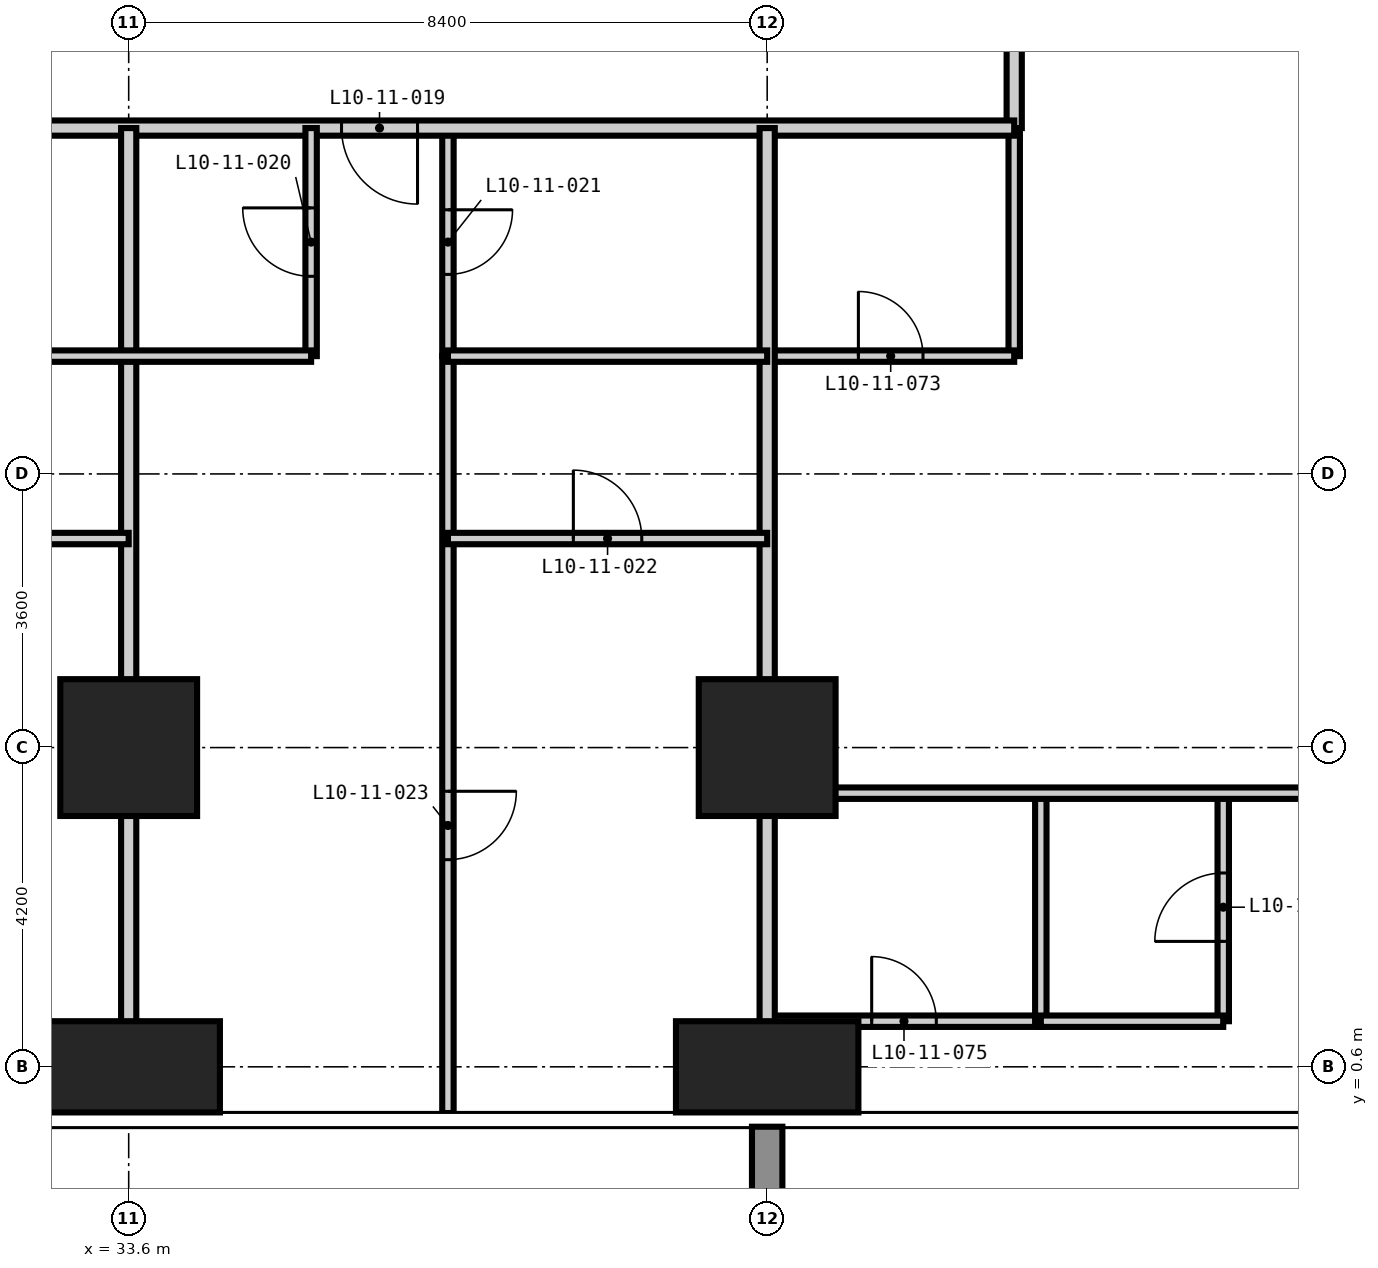
"""IFC4 building model, lengths in metres.
Left out: names, types, materials, properties, quantities, classifications, styles, units other than length and angle.
Written with IfcOpenShell. Run it as: python <this file> out.ifc"""

import sys

from ifc_helpers import new_model, si_unit, direction, frame, frame_2d, origin, origin_2d, place, context, subcontext, project, spatial, rectangle, extrude, element, fill, save


model = new_model("IFC4")
c1 = context("Model", 3, precision=1e-05, world=origin(), true_north=direction((0.0, 1.0)))
c2 = subcontext(c1, "Body", "Model", "MODEL_VIEW")
j1 = project(units=[si_unit("LENGTHUNIT", "METRE"), si_unit("PLANEANGLEUNIT", "RADIAN")], contexts=[c1])
p1 = place(None, origin())
s1 = spatial("IfcSite", under=j1, at=p1, CompositionType="ELEMENT")
p2 = place(p1, origin())
s2 = spatial("IfcBuilding", under=s1, at=p2, CompositionType="ELEMENT")
p3 = place(p2, frame((0.0, 0.0, 45.0)))
s3 = spatial("IfcBuildingStorey", under=s2, at=p3, CompositionType="ELEMENT", Elevation=45.0)
p4 = place(p3, frame((33.6, 0.6, -0.35), z_axis=(0.0, 0.0, 1.0), x_axis=(1.0, 0.0, 0.0)))
e1 = element("IfcColumn", 1, at=p4, inside=s3, PredefinedType="COLUMN", context=c2, shape_type="SweptSolid", body=[
    extrude(rectangle(XDim=2.4, YDim=1.2, at=origin_2d()), origin(), (0.0, 0.0, 1.0), 3.6),
])
p5 = place(p3, frame((33.6, 4.8, -0.35), z_axis=(0.0, 0.0, 1.0), x_axis=(1.0, 0.0, 0.0)))
e2 = element("IfcColumn", 2, at=p5, inside=s3, PredefinedType="COLUMN", context=c2, shape_type="SweptSolid", body=[
    extrude(rectangle(XDim=1.8, YDim=1.8, at=origin_2d()), origin(), (0.0, 0.0, 1.0), 3.6),
])
p6 = place(p3, frame((42.0, 0.6, -0.35), z_axis=(0.0, 0.0, 1.0), x_axis=(1.0, 0.0, 0.0)))
e3 = element("IfcColumn", 3, at=p6, inside=s3, PredefinedType="COLUMN", context=c2, shape_type="SweptSolid", body=[
    extrude(rectangle(XDim=2.4, YDim=1.2, at=origin_2d()), origin(), (0.0, 0.0, 1.0), 3.6),
])
p7 = place(p3, frame((42.0, 4.8, -0.35), z_axis=(0.0, 0.0, 1.0), x_axis=(1.0, 0.0, 0.0)))
e4 = element("IfcColumn", 4, at=p7, inside=s3, PredefinedType="COLUMN", context=c2, shape_type="SweptSolid", body=[
    extrude(rectangle(XDim=1.8, YDim=1.8, at=origin_2d()), origin(), (0.0, 0.0, 1.0), 3.6),
])
p8 = place(p3, frame((37.8, 9.95, 0.0), z_axis=(0.0, 0.0, 1.0), x_axis=(0.0, 1.0, 0.0)))
e5 = element("IfcWall", 5, at=p8, inside=s3, PredefinedType="PARTITIONING", context=c2, shape_type="SweptSolid", body=[
    extrude(rectangle(XDim=3.0, YDim=0.15, at=frame_2d((1.5, 0.0))), origin(), (0.0, 0.0, 1.0), 3.25),
])
p9 = place(p8, frame((1.075, 0.0, 0.0)))
e6 = element("IfcOpeningElement", 6, at=p9, cuts=e5, PredefinedType="OPENING", context=c2, shape_type="SweptSolid", body=[
    extrude(rectangle(XDim=0.85, YDim=2.1, at=frame_2d((0.425, 1.05))), frame((0.0, 0.085, 0.0), z_axis=(0.0, -1.0, 0.0), x_axis=(1.0, 0.0, 0.0)), (0.0, 0.0, 1.0), 0.17),
])
p10 = place(p3, frame((45.25, 9.95, 0.0), z_axis=(0.0, 0.0, 1.0), x_axis=(0.0, 1.0, 0.0)))
e7 = element("IfcWall", 7, at=p10, inside=s3, PredefinedType="PARTITIONING", context=c2, shape_type="SweptSolid", body=[
    extrude(rectangle(XDim=3.0, YDim=0.15, at=frame_2d((1.5, 0.0))), origin(), (0.0, 0.0, 1.0), 3.25),
])
p11 = place(p3, frame((42.0, 1.2, 0.0), z_axis=(0.0, 0.0, 1.0), x_axis=(1.0, 0.0, 0.0)))
e8 = element("IfcWall", 8, at=p11, inside=s3, PredefinedType="PARTITIONING", context=c2, shape_type="SweptSolid", body=[
    extrude(rectangle(XDim=3.6, YDim=0.15, at=frame_2d((1.8, 0.0))), origin(), (0.0, 0.0, 1.0), 3.25),
])
p12 = place(p11, frame((1.375, 0.0, 0.0)))
e9 = element("IfcOpeningElement", 9, at=p12, cuts=e8, PredefinedType="OPENING", context=c2, shape_type="SweptSolid", body=[
    extrude(rectangle(XDim=0.85, YDim=2.1, at=frame_2d((0.425, 1.05))), frame((0.0, 0.085, 0.0), z_axis=(0.0, -1.0, 0.0), x_axis=(1.0, 0.0, 0.0)), (0.0, 0.0, 1.0), 0.17),
])
p13 = place(p3, frame((42.0, 9.95, 0.0), z_axis=(0.0, 0.0, 1.0), x_axis=(1.0, 0.0, 0.0)))
e10 = element("IfcWall", 10, at=p13, inside=s3, PredefinedType="PARTITIONING", context=c2, shape_type="SweptSolid", body=[
    extrude(rectangle(XDim=3.25, YDim=0.15, at=frame_2d((1.625, 0.0))), origin(), (0.0, 0.0, 1.0), 3.25),
])
p14 = place(p13, frame((1.2, 0.0, 0.0)))
e11 = element("IfcOpeningElement", 11, at=p14, cuts=e10, PredefinedType="OPENING", context=c2, shape_type="SweptSolid", body=[
    extrude(rectangle(XDim=0.85, YDim=2.1, at=frame_2d((0.425, 1.05))), frame((0.0, 0.085, 0.0), z_axis=(0.0, -1.0, 0.0), x_axis=(1.0, 0.0, 0.0)), (0.0, 0.0, 1.0), 0.17),
])
p15 = place(p3, frame((45.25, 45.55, 0.0), z_axis=(0.0, 0.0, 1.0), x_axis=(0.0, -1.0, 0.0)))
e12 = element("IfcWall", 12, at=p15, inside=s3, PredefinedType="PARTITIONING", context=c2, shape_type="SweptSolid", body=[
    extrude(rectangle(XDim=32.6, YDim=0.2, at=frame_2d((16.3, 0.0))), origin(), (0.0, 0.0, 1.0), 3.25),
])
p16 = place(p15, frame((24.8, 0.0, 0.0)))
e13 = element("IfcOpeningElement", 13, at=p16, cuts=e12, PredefinedType="OPENING", context=c2, shape_type="SweptSolid", body=[
    extrude(rectangle(XDim=1.0, YDim=2.2, at=frame_2d((0.5, 1.1))), frame((0.0, 0.11, 0.0), z_axis=(0.0, -1.0, 0.0), x_axis=(1.0, 0.0, 0.0)), (0.0, 0.0, 1.0), 0.22),
])
p17 = place(p15, frame((19.85, 0.0, 0.0)))
e14 = element("IfcOpeningElement", 14, at=p17, cuts=e12, PredefinedType="OPENING", context=c2, shape_type="SweptSolid", body=[
    extrude(rectangle(XDim=1.0, YDim=2.2, at=frame_2d((0.5, 1.1))), frame((0.0, 0.11, 0.0), z_axis=(0.0, -1.0, 0.0), x_axis=(1.0, 0.0, 0.0)), (0.0, 0.0, 1.0), 0.22),
])
p18 = place(p15, frame((11.45, 0.0, 0.0)))
e15 = element("IfcOpeningElement", 15, at=p18, cuts=e12, PredefinedType="OPENING", context=c2, shape_type="SweptSolid", body=[
    extrude(rectangle(XDim=1.0, YDim=2.2, at=frame_2d((0.5, 1.1))), frame((0.0, 0.11, 0.0), z_axis=(0.0, -1.0, 0.0), x_axis=(1.0, 0.0, 0.0)), (0.0, 0.0, 1.0), 0.22),
])
p19 = place(p15, frame((6.5, 0.0, 0.0)))
e16 = element("IfcOpeningElement", 16, at=p19, cuts=e12, PredefinedType="OPENING", context=c2, shape_type="SweptSolid", body=[
    extrude(rectangle(XDim=1.0, YDim=2.2, at=frame_2d((0.5, 1.1))), frame((0.0, 0.11, 0.0), z_axis=(0.0, -1.0, 0.0), x_axis=(1.0, 0.0, 0.0)), (0.0, 0.0, 1.0), 0.22),
])
p20 = place(p15, frame((30.175, 0.0, 0.0)))
e17 = element("IfcOpeningElement", 17, at=p20, cuts=e12, PredefinedType="OPENING", context=c2, shape_type="SweptSolid", body=[
    extrude(rectangle(XDim=1.0, YDim=2.2, at=frame_2d((0.5, 1.1))), frame((0.0, 0.11, 0.0), z_axis=(0.0, -1.0, 0.0), x_axis=(1.0, 0.0, 0.0)), (0.0, 0.0, 1.0), 0.22),
])
p21 = place(p15, frame((1.275, 0.0, 0.0)))
e18 = element("IfcOpeningElement", 18, at=p21, cuts=e12, PredefinedType="OPENING", context=c2, shape_type="SweptSolid", body=[
    extrude(rectangle(XDim=1.0, YDim=2.2, at=frame_2d((0.5, 1.1))), frame((0.0, 0.11, 0.0), z_axis=(0.0, -1.0, 0.0), x_axis=(1.0, 0.0, 0.0)), (0.0, 0.0, 1.0), 0.22),
])
p22 = place(p3, frame((45.25, 12.95, 0.0), z_axis=(0.0, 0.0, 1.0), x_axis=(-1.0, 0.0, 0.0)))
e19 = element("IfcWall", 19, at=p22, inside=s3, PredefinedType="PARTITIONING", context=c2, shape_type="SweptSolid", body=[
    extrude(rectangle(XDim=32.3, YDim=0.2, at=frame_2d((16.15, 0.0))), origin(), (0.0, 0.0, 1.0), 3.25),
])
p23 = place(p22, frame((24.65, 0.0, 0.0)))
e20 = element("IfcOpeningElement", 20, at=p23, cuts=e19, PredefinedType="OPENING", context=c2, shape_type="SweptSolid", body=[
    extrude(rectangle(XDim=1.0, YDim=2.2, at=frame_2d((0.5, 1.1))), frame((0.0, 0.11, 0.0), z_axis=(0.0, -1.0, 0.0), x_axis=(1.0, 0.0, 0.0)), (0.0, 0.0, 1.0), 0.22),
])
p24 = place(p22, frame((16.25, 0.0, 0.0)))
e21 = element("IfcOpeningElement", 21, at=p24, cuts=e19, PredefinedType="OPENING", context=c2, shape_type="SweptSolid", body=[
    extrude(rectangle(XDim=1.0, YDim=2.2, at=frame_2d((0.5, 1.1))), frame((0.0, 0.11, 0.0), z_axis=(0.0, -1.0, 0.0), x_axis=(1.0, 0.0, 0.0)), (0.0, 0.0, 1.0), 0.22),
])
p25 = place(p22, frame((7.85, 0.0, 0.0)))
e22 = element("IfcOpeningElement", 22, at=p25, cuts=e19, PredefinedType="OPENING", context=c2, shape_type="SweptSolid", body=[
    extrude(rectangle(XDim=1.0, YDim=2.2, at=frame_2d((0.5, 1.1))), frame((0.0, 0.11, 0.0), z_axis=(0.0, -1.0, 0.0), x_axis=(1.0, 0.0, 0.0)), (0.0, 0.0, 1.0), 0.22),
])
for number, where, z_axis, x_axis in (
    (23, (33.6, -0.008, 0.0), (0.0, 0.0, 1.0), (0.0, 1.0, 0.0)),
    (24, (42.0, -0.008, 0.0), (0.0, 0.0, 1.0), (0.0, 1.0, 0.0)),
):
    element("IfcWall", number, at=place(p3, frame(where, z_axis=z_axis, x_axis=x_axis)), inside=s3, PredefinedType="PARTITIONING", context=c2, shape_type="SweptSolid", body=[
        extrude(rectangle(XDim=12.958, YDim=0.2, at=frame_2d((6.479, 0.0))), origin(), (0.0, 0.0, 1.0), 3.25),
    ])
p26 = place(p3, frame((36.0, 9.95, 0.0), z_axis=(0.0, 0.0, 1.0), x_axis=(0.0, 1.0, 0.0)))
e25 = element("IfcWall", 25, at=p26, inside=s3, PredefinedType="PARTITIONING", context=c2, shape_type="SweptSolid", body=[
    extrude(rectangle(XDim=3.0, YDim=0.15, at=frame_2d((1.5, 0.0))), origin(), (0.0, 0.0, 1.0), 3.25),
])
p27 = place(p26, frame((1.05, 0.0, 0.0)))
e26 = element("IfcOpeningElement", 26, at=p27, cuts=e25, PredefinedType="OPENING", context=c2, shape_type="SweptSolid", body=[
    extrude(rectangle(XDim=0.9, YDim=2.1, at=frame_2d((0.45, 1.05))), frame((0.0, 0.085, 0.0), z_axis=(0.0, -1.0, 0.0), x_axis=(1.0, 0.0, 0.0)), (0.0, 0.0, 1.0), 0.17),
])
p28 = place(p3, frame((37.8, -0.008, 0.0), z_axis=(0.0, 0.0, 1.0), x_axis=(0.0, 1.0, 0.0)))
e27 = element("IfcWall", 27, at=p28, inside=s3, PredefinedType="PARTITIONING", context=c2, shape_type="SweptSolid", body=[
    extrude(rectangle(XDim=9.958, YDim=0.15, at=frame_2d((4.979, 0.0))), origin(), (0.0, 0.0, 1.0), 3.25),
])
p29 = place(p28, frame((3.333, 0.0, 0.0)))
e28 = element("IfcOpeningElement", 28, at=p29, cuts=e27, PredefinedType="OPENING", context=c2, shape_type="SweptSolid", body=[
    extrude(rectangle(XDim=0.9, YDim=2.1, at=frame_2d((0.45, 1.05))), frame((0.0, 0.085, 0.0), z_axis=(0.0, -1.0, 0.0), x_axis=(1.0, 0.0, 0.0)), (0.0, 0.0, 1.0), 0.17),
])
p30 = place(p3, frame((45.6, 1.2, 0.0), z_axis=(0.0, 0.0, 1.0), x_axis=(0.0, 1.0, 0.0)))
e29 = element("IfcWall", 29, at=p30, inside=s3, PredefinedType="PARTITIONING", context=c2, shape_type="SweptSolid", body=[
    extrude(rectangle(XDim=3.0, YDim=0.15, at=frame_2d((1.5, 0.0))), origin(), (0.0, 0.0, 1.0), 3.25),
])
p31 = place(p3, frame((48.0, 1.2, 0.0), z_axis=(0.0, 0.0, 1.0), x_axis=(0.0, 1.0, 0.0)))
e30 = element("IfcWall", 30, at=p31, inside=s3, PredefinedType="PARTITIONING", context=c2, shape_type="SweptSolid", body=[
    extrude(rectangle(XDim=3.0, YDim=0.15, at=frame_2d((1.5, 0.0))), origin(), (0.0, 0.0, 1.0), 3.25),
])
p32 = place(p31, frame((1.05, 0.0, 0.0)))
e31 = element("IfcOpeningElement", 31, at=p32, cuts=e30, PredefinedType="OPENING", context=c2, shape_type="SweptSolid", body=[
    extrude(rectangle(XDim=0.9, YDim=2.1, at=frame_2d((0.45, 1.05))), frame((0.0, 0.085, 0.0), z_axis=(0.0, -1.0, 0.0), x_axis=(1.0, 0.0, 0.0)), (0.0, 0.0, 1.0), 0.17),
])
p33 = place(p3, frame((45.6, 1.2, 0.0), z_axis=(0.0, 0.0, 1.0), x_axis=(1.0, 0.0, 0.0)))
e32 = element("IfcWall", 32, at=p33, inside=s3, PredefinedType="PARTITIONING", context=c2, shape_type="SweptSolid", body=[
    extrude(rectangle(XDim=2.4, YDim=0.15, at=frame_2d((1.2, 0.0))), origin(), (0.0, 0.0, 1.0), 3.25),
])
p34 = place(p3, frame((42.0, 4.2, 0.0), z_axis=(0.0, 0.0, 1.0), x_axis=(1.0, 0.0, 0.0)))
e33 = element("IfcWall", 33, at=p34, inside=s3, PredefinedType="PARTITIONING", context=c2, shape_type="SweptSolid", body=[
    extrude(rectangle(XDim=16.808, YDim=0.15, at=frame_2d((8.404, 0.0))), origin(), (0.0, 0.0, 1.0), 3.25),
])
p35 = place(p34, frame((10.95, 0.0, 0.0)))
e34 = element("IfcOpeningElement", 34, at=p35, cuts=e33, PredefinedType="OPENING", context=c2, shape_type="SweptSolid", body=[
    extrude(rectangle(XDim=0.9, YDim=2.1, at=frame_2d((0.45, 1.05))), frame((0.0, 0.085, 0.0), z_axis=(0.0, -1.0, 0.0), x_axis=(1.0, 0.0, 0.0)), (0.0, 0.0, 1.0), 0.17),
])
p36 = place(p3, frame((29.4, 7.55, 0.0), z_axis=(0.0, 0.0, 1.0), x_axis=(1.0, 0.0, 0.0)))
e35 = element("IfcWall", 35, at=p36, inside=s3, PredefinedType="PARTITIONING", context=c2, shape_type="SweptSolid", body=[
    extrude(rectangle(XDim=4.2, YDim=0.15, at=frame_2d((2.1, 0.0))), origin(), (0.0, 0.0, 1.0), 3.25),
])
p37 = place(p36, frame((1.65, 0.0, 0.0)))
e36 = element("IfcOpeningElement", 36, at=p37, cuts=e35, PredefinedType="OPENING", context=c2, shape_type="SweptSolid", body=[
    extrude(rectangle(XDim=0.9, YDim=2.1, at=frame_2d((0.45, 1.05))), frame((0.0, 0.085, 0.0), z_axis=(0.0, -1.0, 0.0), x_axis=(1.0, 0.0, 0.0)), (0.0, 0.0, 1.0), 0.17),
])
p38 = place(p3, frame((37.8, 7.55, 0.0), z_axis=(0.0, 0.0, 1.0), x_axis=(1.0, 0.0, 0.0)))
e37 = element("IfcWall", 37, at=p38, inside=s3, PredefinedType="PARTITIONING", context=c2, shape_type="SweptSolid", body=[
    extrude(rectangle(XDim=4.2, YDim=0.15, at=frame_2d((2.1, 0.0))), origin(), (0.0, 0.0, 1.0), 3.25),
])
p39 = place(p38, frame((1.65, 0.0, 0.0)))
e38 = element("IfcOpeningElement", 38, at=p39, cuts=e37, PredefinedType="OPENING", context=c2, shape_type="SweptSolid", body=[
    extrude(rectangle(XDim=0.9, YDim=2.1, at=frame_2d((0.45, 1.05))), frame((0.0, 0.085, 0.0), z_axis=(0.0, -1.0, 0.0), x_axis=(1.0, 0.0, 0.0)), (0.0, 0.0, 1.0), 0.17),
])
p40 = place(p3, frame((29.4, 9.95, 0.0), z_axis=(0.0, 0.0, 1.0), x_axis=(1.0, 0.0, 0.0)))
e39 = element("IfcWall", 39, at=p40, inside=s3, PredefinedType="PARTITIONING", context=c2, shape_type="SweptSolid", body=[
    extrude(rectangle(XDim=6.6, YDim=0.15, at=frame_2d((3.3, 0.0))), origin(), (0.0, 0.0, 1.0), 3.25),
])
p41 = place(p3, frame((37.8, 9.95, 0.0), z_axis=(0.0, 0.0, 1.0), x_axis=(1.0, 0.0, 0.0)))
e40 = element("IfcWall", 40, at=p41, inside=s3, PredefinedType="PARTITIONING", context=c2, shape_type="SweptSolid", body=[
    extrude(rectangle(XDim=4.2, YDim=0.15, at=frame_2d((2.1, 0.0))), origin(), (0.0, 0.0, 1.0), 3.25),
])
p42 = place(p25, origin())
e41 = element("IfcDoor", 41, at=p42, inside=s3, OperationType="SINGLE_SWING_LEFT", PredefinedType="DOOR", context=c2, shape_type="SweptSolid", body=[
    extrude(rectangle(XDim=1.0, YDim=2.2, at=frame_2d((0.5, 1.1))), frame((0.0, 0.025, 0.0), z_axis=(0.0, -1.0, 0.0), x_axis=(1.0, 0.0, 0.0)), (0.0, 0.0, 1.0), 0.05),
])
fill(e22, e41)
p43 = place(p27, origin())
e42 = element("IfcDoor", 42, at=p43, inside=s3, OperationType="SINGLE_SWING_RIGHT", PredefinedType="DOOR", context=c2, shape_type="SweptSolid", body=[
    extrude(rectangle(XDim=0.9, YDim=2.1, at=frame_2d((0.45, 1.05))), frame((0.0, 0.025, 0.0), z_axis=(0.0, -1.0, 0.0), x_axis=(1.0, 0.0, 0.0)), (0.0, 0.0, 1.0), 0.05),
])
fill(e26, e42)
p44 = place(p9, frame((0.85, 0.0, 0.0), z_axis=(0.0, 0.0, 1.0), x_axis=(-1.0, 0.0, 0.0)))
e43 = element("IfcDoor", 43, at=p44, inside=s3, OperationType="SINGLE_SWING_LEFT", PredefinedType="DOOR", context=c2, shape_type="SweptSolid", body=[
    extrude(rectangle(XDim=0.85, YDim=2.1, at=frame_2d((0.425, 1.05))), frame((0.0, 0.025, 0.0), z_axis=(0.0, -1.0, 0.0), x_axis=(1.0, 0.0, 0.0)), (0.0, 0.0, 1.0), 0.05),
])
fill(e6, e43)
p45 = place(p39, origin())
e44 = element("IfcDoor", 44, at=p45, inside=s3, OperationType="SINGLE_SWING_LEFT", PredefinedType="DOOR", context=c2, shape_type="SweptSolid", body=[
    extrude(rectangle(XDim=0.9, YDim=2.1, at=frame_2d((0.45, 1.05))), frame((0.0, 0.025, 0.0), z_axis=(0.0, -1.0, 0.0), x_axis=(1.0, 0.0, 0.0)), (0.0, 0.0, 1.0), 0.05),
])
fill(e38, e44)
p46 = place(p29, frame((0.9, 0.0, 0.0), z_axis=(0.0, 0.0, 1.0), x_axis=(-1.0, 0.0, 0.0)))
e45 = element("IfcDoor", 45, at=p46, inside=s3, OperationType="SINGLE_SWING_LEFT", PredefinedType="DOOR", context=c2, shape_type="SweptSolid", body=[
    extrude(rectangle(XDim=0.9, YDim=2.1, at=frame_2d((0.45, 1.05))), frame((0.0, 0.025, 0.0), z_axis=(0.0, -1.0, 0.0), x_axis=(1.0, 0.0, 0.0)), (0.0, 0.0, 1.0), 0.05),
])
fill(e28, e45)
p47 = place(p14, origin())
e46 = element("IfcDoor", 46, at=p47, inside=s3, OperationType="SINGLE_SWING_LEFT", PredefinedType="DOOR", context=c2, shape_type="SweptSolid", body=[
    extrude(rectangle(XDim=0.85, YDim=2.1, at=frame_2d((0.425, 1.05))), frame((0.0, 0.025, 0.0), z_axis=(0.0, -1.0, 0.0), x_axis=(1.0, 0.0, 0.0)), (0.0, 0.0, 1.0), 0.05),
])
fill(e11, e46)
p48 = place(p12, origin())
e47 = element("IfcDoor", 47, at=p48, inside=s3, OperationType="SINGLE_SWING_LEFT", PredefinedType="DOOR", context=c2, shape_type="SweptSolid", body=[
    extrude(rectangle(XDim=0.85, YDim=2.1, at=frame_2d((0.425, 1.05))), frame((0.0, 0.025, 0.0), z_axis=(0.0, -1.0, 0.0), x_axis=(1.0, 0.0, 0.0)), (0.0, 0.0, 1.0), 0.05),
])
fill(e9, e47)
p49 = place(p32, origin())
e48 = element("IfcDoor", 48, at=p49, inside=s3, OperationType="SINGLE_SWING_LEFT", PredefinedType="DOOR", context=c2, shape_type="SweptSolid", body=[
    extrude(rectangle(XDim=0.9, YDim=2.1, at=frame_2d((0.45, 1.05))), frame((0.0, 0.025, 0.0), z_axis=(0.0, -1.0, 0.0), x_axis=(1.0, 0.0, 0.0)), (0.0, 0.0, 1.0), 0.05),
])
fill(e31, e48)
save(model, sys.argv[1])
